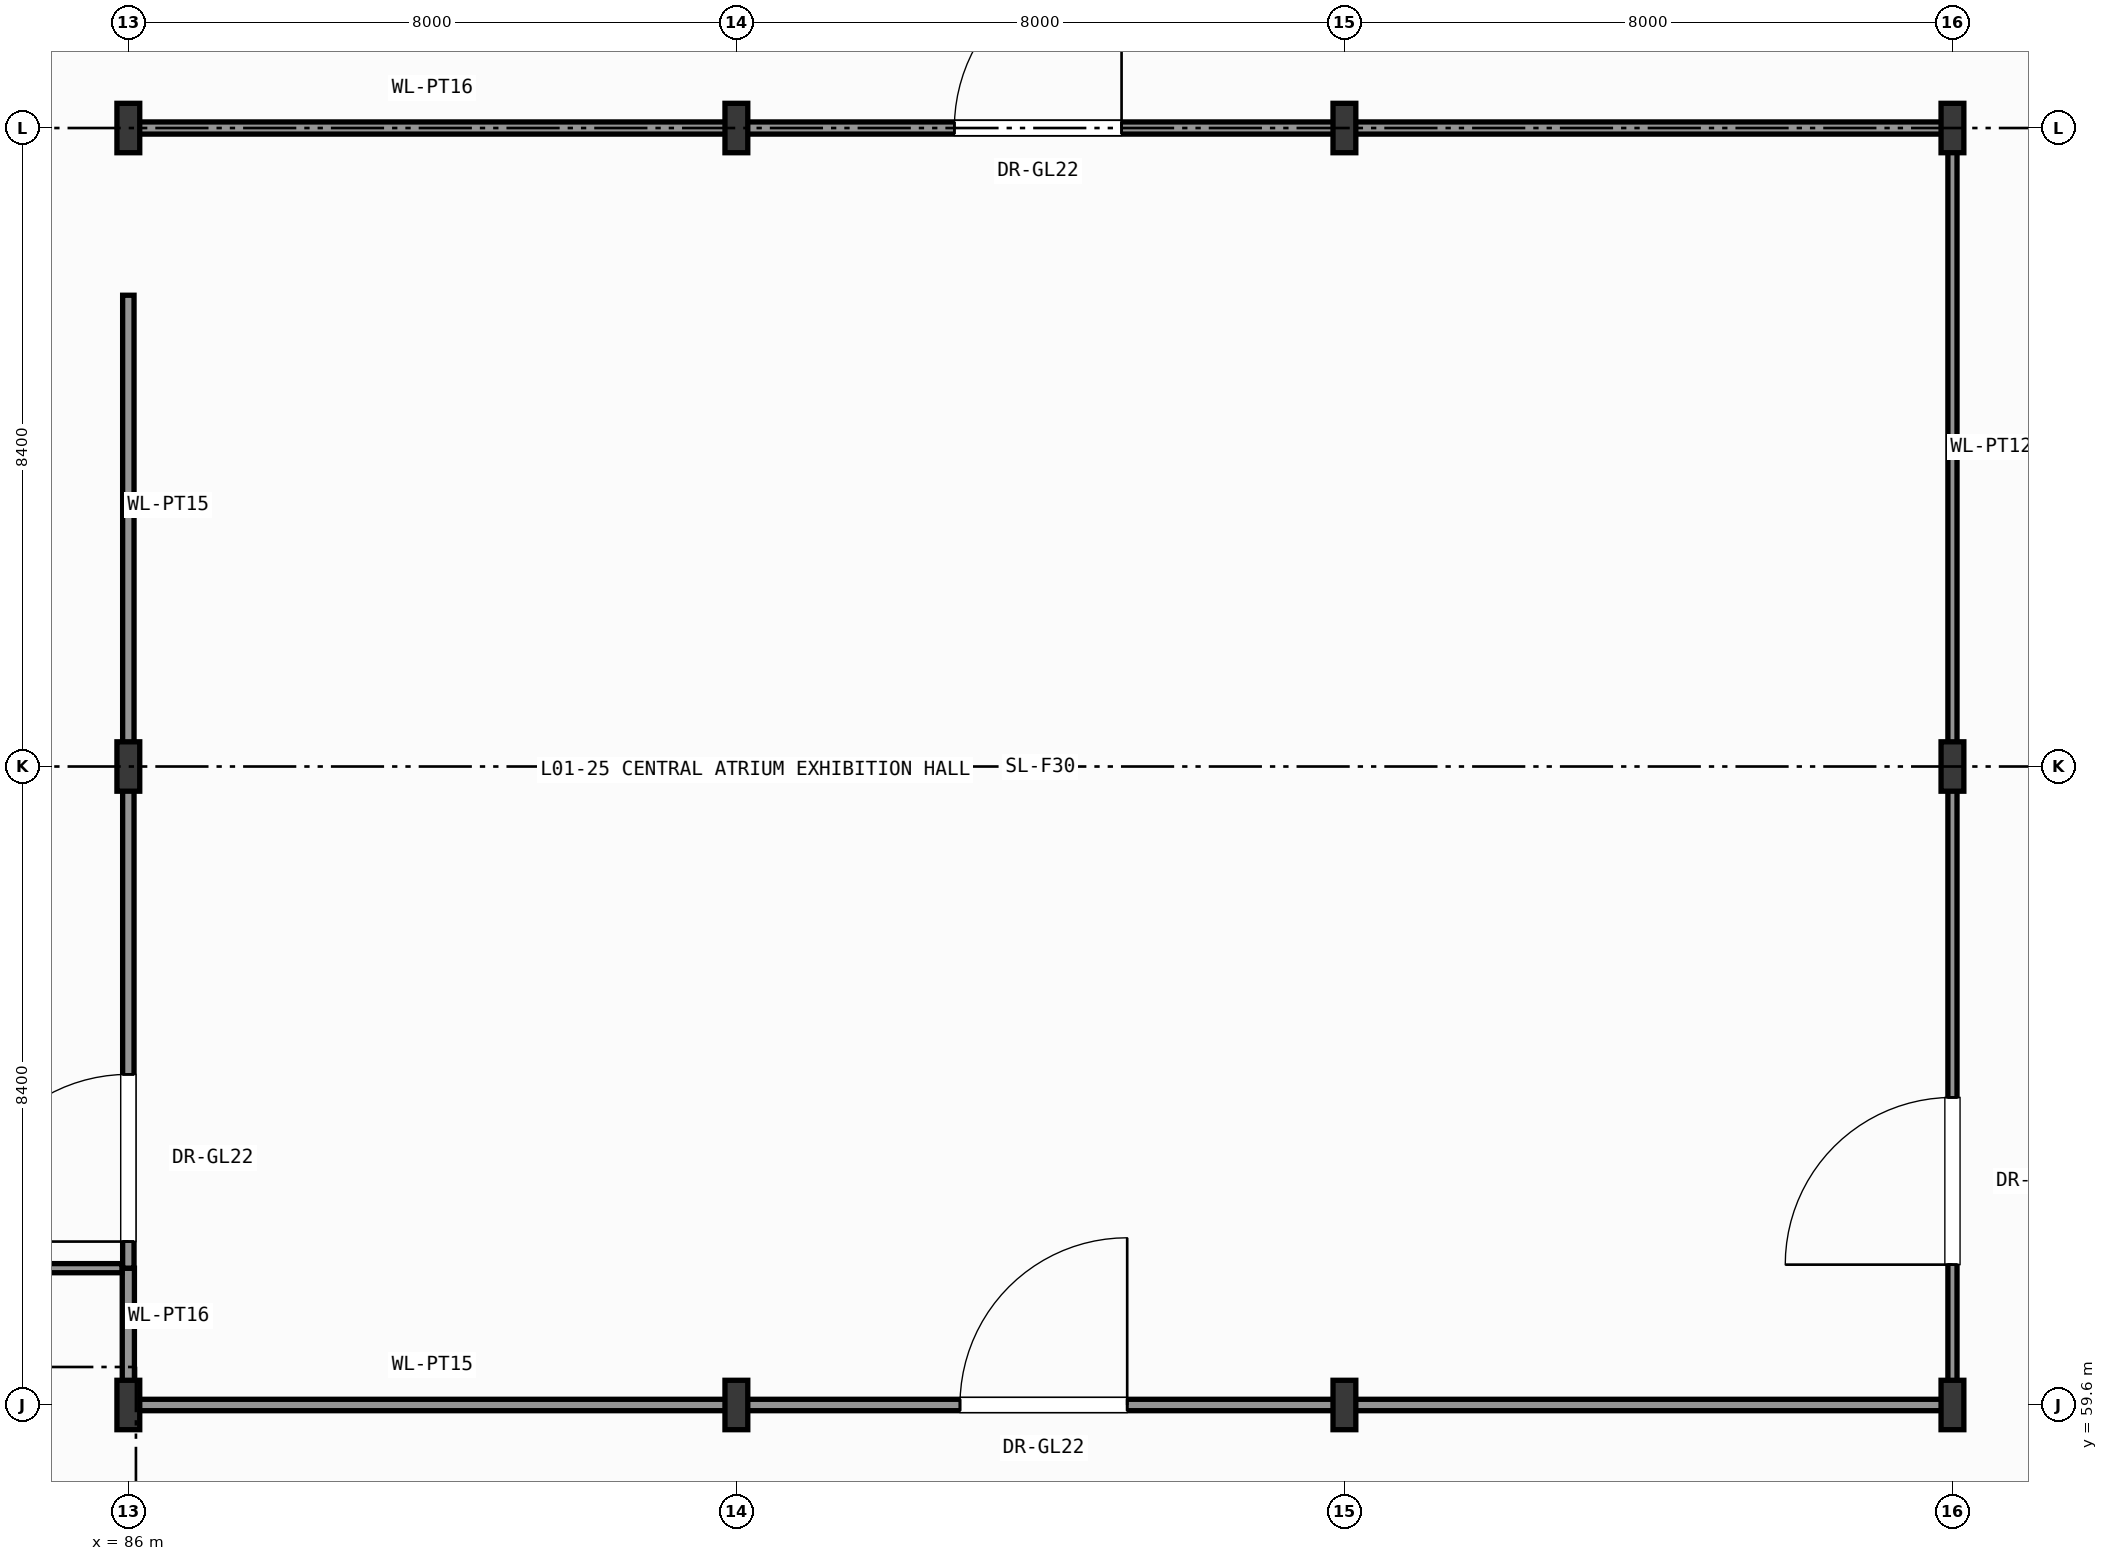
"""IFC4 building model, lengths in metres.
Left out: names, types, materials, properties, quantities, classifications, styles, units other than length and angle.
Written with IfcOpenShell. Run it as: python <this file> out.ifc"""

import sys

from ifc_helpers import new_model, si_unit, direction, frame, frame_2d, origin, origin_2d, place, context, subcontext, project, spatial, rectangle, i_section, extrude, element, fill, save


model = new_model("IFC4")
c1 = context("Model", 3, precision=1e-05, world=origin(), true_north=direction((0.0, 1.0)))
c2 = subcontext(c1, "Body", "Model", "MODEL_VIEW")
j1 = project(units=[si_unit("LENGTHUNIT", "METRE"), si_unit("PLANEANGLEUNIT", "RADIAN")], contexts=[c1])
p1 = place(None, origin())
s1 = spatial("IfcSite", under=j1, at=p1, CompositionType="ELEMENT")
p2 = place(p1, origin())
s2 = spatial("IfcBuilding", under=s1, at=p2, CompositionType="ELEMENT")
p3 = place(p2, origin())
s3 = spatial("IfcBuildingStorey", under=s2, at=p3, CompositionType="ELEMENT", Elevation=0.0)
for number, where, z_axis, x_axis in (
    (1, (86.0, 59.6, 0.0), (0.0, 0.0, 1.0), (1.0, 0.0, 0.0)),
    (2, (86.0, 68.0, 0.0), (0.0, 0.0, 1.0), (1.0, 0.0, 0.0)),
    (3, (86.0, 76.4, 0.0), (0.0, 0.0, 1.0), (1.0, 0.0, 0.0)),
    (4, (94.0, 59.6, 0.0), (0.0, 0.0, 1.0), (1.0, 0.0, 0.0)),
    (5, (94.0, 76.4, 0.0), (0.0, 0.0, 1.0), (1.0, 0.0, 0.0)),
    (6, (102.0, 59.6, 0.0), (0.0, 0.0, 1.0), (1.0, 0.0, 0.0)),
    (7, (102.0, 76.4, 0.0), (0.0, 0.0, 1.0), (1.0, 0.0, 0.0)),
    (8, (110.0, 59.6, 0.0), (0.0, 0.0, 1.0), (1.0, 0.0, 0.0)),
    (9, (110.0, 68.0, 0.0), (0.0, 0.0, 1.0), (1.0, 0.0, 0.0)),
    (10, (110.0, 76.4, 0.0), (0.0, 0.0, 1.0), (1.0, 0.0, 0.0)),
):
    element("IfcColumn", number, at=place(p3, frame(where, z_axis=z_axis, x_axis=x_axis)), inside=s3, PredefinedType="COLUMN", context=c2, shape_type="SweptSolid", body=[
        extrude(i_section(OverallWidth=0.3, OverallDepth=0.65, WebThickness=0.016, FlangeThickness=0.031, FilletRadius=0.027, at=origin_2d()), origin(), (0.0, 0.0, 1.0), 7.8),
    ])
p4 = place(p3, frame((86.0, 59.6, 0.0), z_axis=(0.0, 0.0, 1.0), x_axis=(0.0, 1.0, 0.0)))
e11 = element("IfcWall", 11, at=p4, inside=s3, PredefinedType="PARTITIONING", context=c2, shape_type="SweptSolid", body=[
    extrude(rectangle(XDim=1.8, YDim=0.16, at=frame_2d((0.9, 0.0))), origin(), (0.0, 0.0, 1.0), 7.085),
])
p5 = place(p3, frame((86.084, 59.6, 0.0), z_axis=(0.0, 0.0, 1.0), x_axis=(1.0, 0.0, 0.0)))
e12 = element("IfcWall", 12, at=p5, inside=s3, PredefinedType="PARTITIONING", context=c2, shape_type="SweptSolid", body=[
    extrude(rectangle(XDim=23.916, YDim=0.15, at=frame_2d((11.958, 0.0))), origin(), (0.0, 0.0, 1.0), 7.135),
])
p6 = place(p5, frame((10.858, 0.0, 0.0)))
e13 = element("IfcOpeningElement", 13, at=p6, cuts=e12, PredefinedType="OPENING", context=c2, shape_type="SweptSolid", body=[
    extrude(rectangle(XDim=2.2, YDim=2.6, at=frame_2d((1.1, 1.3))), frame((0.0, 0.085, 0.0), z_axis=(0.0, -1.0, 0.0), x_axis=(1.0, 0.0, 0.0)), (0.0, 0.0, 1.0), 0.17),
])
p7 = place(p3, frame((110.0, 59.679, 0.0), z_axis=(0.0, 0.0, 1.0), x_axis=(0.0, 1.0, 0.0)))
e14 = element("IfcWall", 14, at=p7, inside=s3, PredefinedType="PARTITIONING", context=c2, shape_type="SweptSolid", body=[
    extrude(rectangle(XDim=16.721, YDim=0.12, at=frame_2d((8.36, 0.0))), origin(), (0.0, 0.0, 1.0), 7.085),
])
p8 = place(p7, frame((1.768, 0.0, 0.0)))
e15 = element("IfcOpeningElement", 15, at=p8, cuts=e14, PredefinedType="OPENING", context=c2, shape_type="SweptSolid", body=[
    extrude(rectangle(XDim=2.2, YDim=2.6, at=frame_2d((1.1, 1.3))), frame((0.0, 0.07, 0.0), z_axis=(0.0, -1.0, 0.0), x_axis=(1.0, 0.0, 0.0)), (0.0, 0.0, 1.0), 0.14),
])
p9 = place(p3, frame((86.0, 76.4, 0.0), z_axis=(0.0, 0.0, 1.0), x_axis=(1.0, 0.0, 0.0)))
e16 = element("IfcWall", 16, at=p9, inside=s3, PredefinedType="PARTITIONING", context=c2, shape_type="SweptSolid", body=[
    extrude(rectangle(XDim=23.936, YDim=0.16, at=frame_2d((11.968, 0.0))), origin(), (0.0, 0.0, 1.0), 7.135),
])
p10 = place(p9, frame((10.868, 0.0, 0.0)))
e17 = element("IfcOpeningElement", 17, at=p10, cuts=e16, PredefinedType="OPENING", context=c2, shape_type="SweptSolid", body=[
    extrude(rectangle(XDim=2.2, YDim=2.6, at=frame_2d((1.1, 1.3))), frame((0.0, 0.09, 0.0), z_axis=(0.0, -1.0, 0.0), x_axis=(1.0, 0.0, 0.0)), (0.0, 0.0, 1.0), 0.18),
])
p11 = place(p3, frame((86.0, 61.4, 0.0), z_axis=(0.0, 0.0, 1.0), x_axis=(0.0, 1.0, 0.0)))
e18 = element("IfcWall", 18, at=p11, inside=s3, PredefinedType="PARTITIONING", context=c2, shape_type="SweptSolid", body=[
    extrude(rectangle(XDim=12.8, YDim=0.15, at=frame_2d((6.4, 0.0))), origin(), (0.0, 0.0, 1.0), 7.085),
])
p12 = place(p11, frame((0.35, 0.0, 0.0)))
e19 = element("IfcOpeningElement", 19, at=p12, cuts=e18, PredefinedType="OPENING", context=c2, shape_type="SweptSolid", body=[
    extrude(rectangle(XDim=2.2, YDim=2.6, at=frame_2d((1.1, 1.3))), frame((0.0, 0.085, 0.0), z_axis=(0.0, -1.0, 0.0), x_axis=(1.0, 0.0, 0.0)), (0.0, 0.0, 1.0), 0.17),
])
p13 = place(p3, frame((74.6, 61.4, 0.0), z_axis=(0.0, 0.0, 1.0), x_axis=(1.0, 0.0, 0.0)))
e20 = element("IfcWall", 20, at=p13, inside=s3, PredefinedType="PARTITIONING", context=c2, shape_type="SweptSolid", body=[
    extrude(rectangle(XDim=11.316, YDim=0.12, at=frame_2d((5.658, 0.0))), origin(), (0.0, 0.0, 1.0), 7.54),
])
p14 = place(p13, frame((4.558, 0.0, 0.0)))
e21 = element("IfcOpeningElement", 21, at=p14, cuts=e20, PredefinedType="OPENING", context=c2, shape_type="SweptSolid", body=[
    extrude(rectangle(XDim=2.2, YDim=2.6, at=frame_2d((1.1, 1.3))), frame((0.0, 0.07, 0.0), z_axis=(0.0, -1.0, 0.0), x_axis=(1.0, 0.0, 0.0)), (0.0, 0.0, 1.0), 0.14),
])
p15 = place(p6, origin())
e22 = element("IfcDoor", 22, at=p15, inside=s3, OperationType="SINGLE_SWING_RIGHT", PredefinedType="DOOR", context=c2, shape_type="SweptSolid", body=[
    extrude(rectangle(XDim=2.2, YDim=2.6, at=frame_2d((1.1, 1.3))), frame((0.0, 0.025, 0.0), z_axis=(0.0, -1.0, 0.0), x_axis=(1.0, 0.0, 0.0)), (0.0, 0.0, 1.0), 0.05),
])
fill(e13, e22)
p16 = place(p8, origin())
e23 = element("IfcDoor", 23, at=p16, inside=s3, OperationType="SINGLE_SWING_LEFT", PredefinedType="DOOR", context=c2, shape_type="SweptSolid", body=[
    extrude(rectangle(XDim=2.2, YDim=2.6, at=frame_2d((1.1, 1.3))), frame((0.0, 0.025, 0.0), z_axis=(0.0, -1.0, 0.0), x_axis=(1.0, 0.0, 0.0)), (0.0, 0.0, 1.0), 0.05),
])
fill(e15, e23)
p17 = place(p10, origin())
e24 = element("IfcDoor", 24, at=p17, inside=s3, OperationType="SINGLE_SWING_RIGHT", PredefinedType="DOOR", context=c2, shape_type="SweptSolid", body=[
    extrude(rectangle(XDim=2.2, YDim=2.6, at=frame_2d((1.1, 1.3))), frame((0.0, 0.025, 0.0), z_axis=(0.0, -1.0, 0.0), x_axis=(1.0, 0.0, 0.0)), (0.0, 0.0, 1.0), 0.05),
])
fill(e17, e24)
p18 = place(p12, origin())
e25 = element("IfcDoor", 25, at=p18, inside=s3, OperationType="SINGLE_SWING_LEFT", PredefinedType="DOOR", context=c2, shape_type="SweptSolid", body=[
    extrude(rectangle(XDim=2.2, YDim=2.6, at=frame_2d((1.1, 1.3))), frame((0.0, 0.025, 0.0), z_axis=(0.0, -1.0, 0.0), x_axis=(1.0, 0.0, 0.0)), (0.0, 0.0, 1.0), 0.05),
])
fill(e19, e25)
save(model, sys.argv[1])
